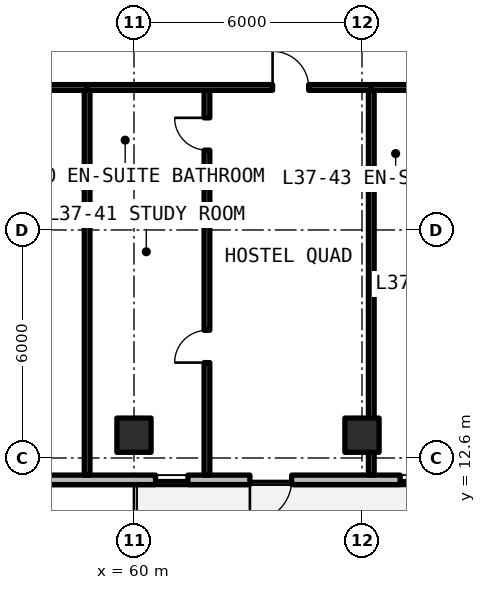
"""IFC4 building model, lengths in metres.
Left out: names, types, materials, properties, quantities, classifications, styles, units other than length and angle.
Written with IfcOpenShell. Run it as: python <this file> out.ifc"""

import sys

from ifc_helpers import new_model, si_unit, direction, frame, frame_2d, origin, origin_2d, place, context, subcontext, project, spatial, rectangle, extrude, element, fill, save


model = new_model("IFC4")
c1 = context("Model", 3, precision=1e-05, world=origin(), true_north=direction((0.0, 1.0)))
c2 = subcontext(c1, "Body", "Model", "MODEL_VIEW")
j1 = project(units=[si_unit("LENGTHUNIT", "METRE"), si_unit("PLANEANGLEUNIT", "RADIAN")], contexts=[c1])
p1 = place(None, origin())
s1 = spatial("IfcSite", under=j1, at=p1, CompositionType="ELEMENT")
p2 = place(p1, origin())
s2 = spatial("IfcBuilding", under=s1, at=p2, CompositionType="ELEMENT")
p3 = place(p2, frame((0.0, 0.0, 135.3)))
s3 = spatial("IfcBuildingStorey", under=s2, at=p3, CompositionType="ELEMENT", Elevation=135.3)
for number, where, z_axis, x_axis in (
    (1, (60.0, 13.2, 0.0), (0.0, 0.0, 1.0), (1.0, 0.0, 0.0)),
    (2, (66.0, 13.2, 0.0), (0.0, 0.0, 1.0), (1.0, 0.0, 0.0)),
):
    element("IfcColumn", number, at=place(p3, frame(where, z_axis=z_axis, x_axis=x_axis)), inside=s3, PredefinedType="COLUMN", context=c2, shape_type="SweptSolid", body=[
        extrude(rectangle(XDim=0.9, YDim=0.9, at=origin_2d()), origin(), (0.0, 0.0, 1.0), 3.3),
    ])
p4 = place(p3, frame((52.125, 12.025, 0.0), z_axis=(0.0, 0.0, 1.0), x_axis=(1.0, 0.0, 0.0)))
e3 = element("IfcWall", 3, at=p4, inside=s3, PredefinedType="SOLIDWALL", context=c2, shape_type="SweptSolid", body=[
    extrude(rectangle(XDim=43.623, YDim=0.25, at=frame_2d((21.812, 0.0))), origin(), (0.0, 0.0, 1.0), 3.08),
])
p5 = place(p4, frame((10.925, 0.0, 0.0)))
e4 = element("IfcOpeningElement", 4, at=p5, cuts=e3, PredefinedType="OPENING", context=c2, shape_type="SweptSolid", body=[
    extrude(rectangle(XDim=1.1, YDim=2.15, at=frame_2d((0.55, 1.075))), frame((0.0, 0.135, 0.0), z_axis=(0.0, -1.0, 0.0), x_axis=(1.0, 0.0, 0.0)), (0.0, 0.0, 1.0), 0.27),
])
p6 = place(p4, frame((22.025, 0.0, 0.0)))
e5 = element("IfcOpeningElement", 5, at=p6, cuts=e3, PredefinedType="OPENING", context=c2, shape_type="SweptSolid", body=[
    extrude(rectangle(XDim=1.1, YDim=2.15, at=frame_2d((0.55, 1.075))), frame((0.0, 0.135, 0.0), z_axis=(0.0, -1.0, 0.0), x_axis=(1.0, 0.0, 0.0)), (0.0, 0.0, 1.0), 0.27),
])
p7 = place(p4, frame((2.738, 0.0, 0.78)))
e6 = element("IfcOpeningElement", 6, at=p7, cuts=e3, PredefinedType="OPENING", context=c2, shape_type="SweptSolid", body=[
    extrude(rectangle(XDim=1.8, YDim=1.66, at=frame_2d((0.9, 0.83))), frame((0.0, 0.135, 0.0), z_axis=(0.0, -1.0, 0.0), x_axis=(1.0, 0.0, 0.0)), (0.0, 0.0, 1.0), 0.27),
])
p8 = place(p4, frame((8.443, 0.0, 0.78)))
e7 = element("IfcOpeningElement", 7, at=p8, cuts=e3, PredefinedType="OPENING", context=c2, shape_type="SweptSolid", body=[
    extrude(rectangle(XDim=0.85, YDim=1.65, at=frame_2d((0.425, 0.825))), frame((0.0, 0.135, 0.0), z_axis=(0.0, -1.0, 0.0), x_axis=(1.0, 0.0, 0.0)), (0.0, 0.0, 1.0), 0.27),
])
p9 = place(p4, frame((14.879, 0.0, 0.78)))
e8 = element("IfcOpeningElement", 8, at=p9, cuts=e3, PredefinedType="OPENING", context=c2, shape_type="SweptSolid", body=[
    extrude(rectangle(XDim=0.85, YDim=1.65, at=frame_2d((0.425, 0.825))), frame((0.0, 0.135, 0.0), z_axis=(0.0, -1.0, 0.0), x_axis=(1.0, 0.0, 0.0)), (0.0, 0.0, 1.0), 0.27),
])
p10 = place(p4, frame((17.184, 0.0, 0.78)))
e9 = element("IfcOpeningElement", 9, at=p10, cuts=e3, PredefinedType="OPENING", context=c2, shape_type="SweptSolid", body=[
    extrude(rectangle(XDim=1.8, YDim=1.66, at=frame_2d((0.9, 0.83))), frame((0.0, 0.135, 0.0), z_axis=(0.0, -1.0, 0.0), x_axis=(1.0, 0.0, 0.0)), (0.0, 0.0, 1.0), 0.27),
])
p11 = place(p4, frame((26.643, 0.0, 0.78)))
e10 = element("IfcOpeningElement", 10, at=p11, cuts=e3, PredefinedType="OPENING", context=c2, shape_type="SweptSolid", body=[
    extrude(rectangle(XDim=1.4, YDim=1.65, at=frame_2d((0.7, 0.825))), frame((0.0, 0.135, 0.0), z_axis=(0.0, -1.0, 0.0), x_axis=(1.0, 0.0, 0.0)), (0.0, 0.0, 1.0), 0.27),
])
p12 = place(p4, frame((32.777, 0.0, 0.78)))
e11 = element("IfcOpeningElement", 11, at=p12, cuts=e3, PredefinedType="OPENING", context=c2, shape_type="SweptSolid", body=[
    extrude(rectangle(XDim=1.8, YDim=1.66, at=frame_2d((0.9, 0.83))), frame((0.0, 0.135, 0.0), z_axis=(0.0, -1.0, 0.0), x_axis=(1.0, 0.0, 0.0)), (0.0, 0.0, 1.0), 0.27),
])
p13 = place(p4, frame((38.836, 0.0, 0.78)))
e12 = element("IfcOpeningElement", 12, at=p13, cuts=e3, PredefinedType="OPENING", context=c2, shape_type="SweptSolid", body=[
    extrude(rectangle(XDim=1.8, YDim=1.66, at=frame_2d((0.9, 0.83))), frame((0.0, 0.135, 0.0), z_axis=(0.0, -1.0, 0.0), x_axis=(1.0, 0.0, 0.0)), (0.0, 0.0, 1.0), 0.27),
])
p14 = place(p3, frame((58.767, 12.15, 0.0), z_axis=(0.0, 0.0, 1.0), x_axis=(0.0, 1.0, 0.0)))
e13 = element("IfcWall", 13, at=p14, inside=s3, PredefinedType="SOLIDWALL", context=c2, shape_type="SweptSolid", body=[
    extrude(rectangle(XDim=10.2, YDim=0.15, at=frame_2d((5.1, 0.0))), origin(), (0.0, 0.0, 1.0), 2.35),
])
p15 = place(p3, frame((52.12, 22.35, 0.0), z_axis=(0.0, 0.0, 1.0), x_axis=(1.0, 0.0, 0.0)))
e14 = element("IfcWall", 14, at=p15, inside=s3, PredefinedType="SOLIDWALL", context=c2, shape_type="SweptSolid", body=[
    extrude(rectangle(XDim=6.646, YDim=0.15, at=frame_2d((3.323, 0.0))), origin(), (0.0, 0.0, 1.0), 2.35),
])
p16 = place(p15, frame((2.848, 0.0, 0.0)))
e15 = element("IfcOpeningElement", 15, at=p16, cuts=e14, PredefinedType="OPENING", context=c2, shape_type="SweptSolid", body=[
    extrude(rectangle(XDim=0.95, YDim=2.15, at=frame_2d((0.475, 1.075))), frame((0.0, 0.085, 0.0), z_axis=(0.0, -1.0, 0.0), x_axis=(1.0, 0.0, 0.0)), (0.0, 0.0, 1.0), 0.17),
])
p17 = place(p3, frame((66.244, 12.15, 0.0), z_axis=(0.0, 0.0, 1.0), x_axis=(0.0, 1.0, 0.0)))
e16 = element("IfcWall", 16, at=p17, inside=s3, PredefinedType="SOLIDWALL", context=c2, shape_type="SweptSolid", body=[
    extrude(rectangle(XDim=10.2, YDim=0.15, at=frame_2d((5.1, 0.0))), origin(), (0.0, 0.0, 1.0), 2.35),
])
p18 = place(p3, frame((58.767, 19.9, 0.0), z_axis=(0.0, 0.0, 1.0), x_axis=(1.0, 0.0, 0.0)))
e17 = element("IfcWall", 17, at=p18, inside=s3, PredefinedType="PARTITIONING", context=c2, shape_type="SweptSolid", body=[
    extrude(rectangle(XDim=3.153, YDim=0.15, at=frame_2d((1.577, 0.0))), origin(), (0.0, 0.0, 1.0), 2.35),
])
p19 = place(p3, frame((61.92, 12.15, 0.0), z_axis=(0.0, 0.0, 1.0), x_axis=(0.0, 1.0, 0.0)))
e18 = element("IfcWall", 18, at=p19, inside=s3, PredefinedType="PARTITIONING", context=c2, shape_type="SweptSolid", body=[
    extrude(rectangle(XDim=10.2, YDim=0.15, at=frame_2d((5.1, 0.0))), origin(), (0.0, 0.0, 1.0), 2.35),
])
p20 = place(p19, frame((2.96, 0.0, 0.0)))
e19 = element("IfcOpeningElement", 19, at=p20, cuts=e18, PredefinedType="OPENING", context=c2, shape_type="SweptSolid", body=[
    extrude(rectangle(XDim=0.85, YDim=2.1, at=frame_2d((0.425, 1.05))), frame((0.0, 0.085, 0.0), z_axis=(0.0, -1.0, 0.0), x_axis=(1.0, 0.0, 0.0)), (0.0, 0.0, 1.0), 0.17),
])
p21 = place(p19, frame((8.55, 0.0, 0.0)))
e20 = element("IfcOpeningElement", 20, at=p21, cuts=e18, PredefinedType="OPENING", context=c2, shape_type="SweptSolid", body=[
    extrude(rectangle(XDim=0.85, YDim=2.1, at=frame_2d((0.425, 1.05))), frame((0.0, 0.085, 0.0), z_axis=(0.0, -1.0, 0.0), x_axis=(1.0, 0.0, 0.0)), (0.0, 0.0, 1.0), 0.17),
])
p22 = place(p3, frame((58.767, 22.35, 0.0), z_axis=(0.0, 0.0, 1.0), x_axis=(1.0, 0.0, 0.0)))
e21 = element("IfcWall", 21, at=p22, inside=s3, PredefinedType="SOLIDWALL", context=c2, shape_type="SweptSolid", body=[
    extrude(rectangle(XDim=7.478, YDim=0.15, at=frame_2d((3.739, 0.0))), origin(), (0.0, 0.0, 1.0), 2.35),
])
p23 = place(p22, frame((4.881, 0.0, 0.0)))
e22 = element("IfcOpeningElement", 22, at=p23, cuts=e21, PredefinedType="OPENING", context=c2, shape_type="SweptSolid", body=[
    extrude(rectangle(XDim=0.95, YDim=2.15, at=frame_2d((0.475, 1.075))), frame((0.0, 0.085, 0.0), z_axis=(0.0, -1.0, 0.0), x_axis=(1.0, 0.0, 0.0)), (0.0, 0.0, 1.0), 0.17),
])
p24 = place(p3, frame((66.244, 19.9, 0.0), z_axis=(0.0, 0.0, 1.0), x_axis=(1.0, 0.0, 0.0)))
e23 = element("IfcWall", 23, at=p24, inside=s3, PredefinedType="PARTITIONING", context=c2, shape_type="SweptSolid", body=[
    extrude(rectangle(XDim=2.35, YDim=0.15, at=frame_2d((1.175, 0.0))), origin(), (0.0, 0.0, 1.0), 2.35),
])
p25 = place(p3, frame((66.244, 22.35, 0.0), z_axis=(0.0, 0.0, 1.0), x_axis=(1.0, 0.0, 0.0)))
e24 = element("IfcWall", 24, at=p25, inside=s3, PredefinedType="SOLIDWALL", context=c2, shape_type="SweptSolid", body=[
    extrude(rectangle(XDim=7.2, YDim=0.15, at=frame_2d((3.6, 0.0))), origin(), (0.0, 0.0, 1.0), 2.35),
])
p26 = place(p25, frame((4.34, 0.0, 0.0)))
e25 = element("IfcOpeningElement", 25, at=p26, cuts=e24, PredefinedType="OPENING", context=c2, shape_type="SweptSolid", body=[
    extrude(rectangle(XDim=0.95, YDim=2.15, at=frame_2d((0.475, 1.075))), frame((0.0, 0.085, 0.0), z_axis=(0.0, -1.0, 0.0), x_axis=(1.0, 0.0, 0.0)), (0.0, 0.0, 1.0), 0.17),
])
p27 = place(p5, frame((1.1, 0.0, 0.0), z_axis=(0.0, 0.0, 1.0), x_axis=(-1.0, 0.0, 0.0)))
e26 = element("IfcDoor", 26, at=p27, inside=s3, OperationType="SINGLE_SWING_LEFT", PredefinedType="DOOR", context=c2, shape_type="SweptSolid", body=[
    extrude(rectangle(XDim=1.1, YDim=2.15, at=frame_2d((0.55, 1.075))), frame((0.0, 0.025, 0.0), z_axis=(0.0, -1.0, 0.0), x_axis=(1.0, 0.0, 0.0)), (0.0, 0.0, 1.0), 0.05),
])
fill(e4, e26)
p28 = place(p8, origin())
e27 = element("IfcWindow", 27, at=p28, inside=s3, PartitioningType="SINGLE_PANEL", PredefinedType="WINDOW", context=c2, shape_type="SweptSolid", body=[
    extrude(rectangle(XDim=0.85, YDim=1.65, at=frame_2d((0.425, 0.825))), frame((0.0, 0.03, 0.0), z_axis=(0.0, -1.0, 0.0), x_axis=(1.0, 0.0, 0.0)), (0.0, 0.0, 1.0), 0.06),
])
fill(e7, e27)
p29 = place(p9, origin())
e28 = element("IfcWindow", 28, at=p29, inside=s3, PartitioningType="SINGLE_PANEL", PredefinedType="WINDOW", context=c2, shape_type="SweptSolid", body=[
    extrude(rectangle(XDim=0.85, YDim=1.65, at=frame_2d((0.425, 0.825))), frame((0.0, 0.03, 0.0), z_axis=(0.0, -1.0, 0.0), x_axis=(1.0, 0.0, 0.0)), (0.0, 0.0, 1.0), 0.06),
])
fill(e8, e28)
p30 = place(p20, origin())
e29 = element("IfcDoor", 29, at=p30, inside=s3, OperationType="SINGLE_SWING_LEFT", PredefinedType="DOOR", context=c2, shape_type="SweptSolid", body=[
    extrude(rectangle(XDim=0.85, YDim=2.1, at=frame_2d((0.425, 1.05))), frame((0.0, 0.025, 0.0), z_axis=(0.0, -1.0, 0.0), x_axis=(1.0, 0.0, 0.0)), (0.0, 0.0, 1.0), 0.05),
])
fill(e19, e29)
p31 = place(p21, origin())
e30 = element("IfcDoor", 30, at=p31, inside=s3, OperationType="SINGLE_SWING_RIGHT", PredefinedType="DOOR", context=c2, shape_type="SweptSolid", body=[
    extrude(rectangle(XDim=0.85, YDim=2.1, at=frame_2d((0.425, 1.05))), frame((0.0, 0.025, 0.0), z_axis=(0.0, -1.0, 0.0), x_axis=(1.0, 0.0, 0.0)), (0.0, 0.0, 1.0), 0.05),
])
fill(e20, e30)
p32 = place(p23, origin())
e31 = element("IfcDoor", 31, at=p32, inside=s3, OperationType="SINGLE_SWING_LEFT", PredefinedType="DOOR", context=c2, shape_type="SweptSolid", body=[
    extrude(rectangle(XDim=0.95, YDim=2.15, at=frame_2d((0.475, 1.075))), frame((0.0, 0.025, 0.0), z_axis=(0.0, -1.0, 0.0), x_axis=(1.0, 0.0, 0.0)), (0.0, 0.0, 1.0), 0.05),
])
fill(e22, e31)
save(model, sys.argv[1])
